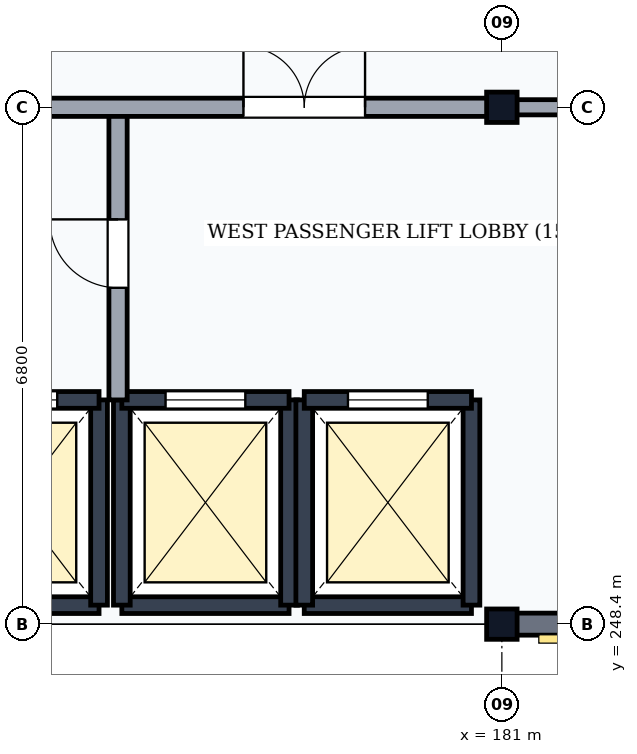
"""IFC4 building model, lengths in metres.
Left out: names, types, materials, properties, quantities, classifications, styles, units other than length and angle.
Written with IfcOpenShell. Run it as: python <this file> out.ifc"""

import sys

from ifc_helpers import new_model, si_unit, direction, frame, frame_2d, origin, origin_2d, place, context, subcontext, project, spatial, rectangle, i_section, extrude, element, fill, save


model = new_model("IFC4")
c1 = context("Model", 3, precision=1e-05, world=origin(), true_north=direction((0.0, 1.0)))
c2 = subcontext(c1, "Body", "Model", "MODEL_VIEW")
j1 = project(units=[si_unit("LENGTHUNIT", "METRE"), si_unit("PLANEANGLEUNIT", "RADIAN")], contexts=[c1])
p1 = place(None, origin())
s1 = spatial("IfcSite", under=j1, at=p1, CompositionType="ELEMENT")
p2 = place(p1, origin())
s2 = spatial("IfcBuilding", under=s1, at=p2, CompositionType="ELEMENT")
p3 = place(p2, frame((0.0, 0.0, 15.6)))
s3 = spatial("IfcBuildingStorey", under=s2, at=p3, CompositionType="ELEMENT", Elevation=15.6)
for number, where, z_axis, x_axis in (
    (1, (181.0, 248.4, 0.0), (0.0, 0.0, 1.0), (1.0, 0.0, 0.0)),
    (2, (181.0, 255.2, 0.0), (0.0, 0.0, 1.0), (1.0, 0.0, 0.0)),
):
    element("IfcColumn", number, at=place(p3, frame(where, z_axis=z_axis, x_axis=x_axis)), inside=s3, PredefinedType="COLUMN", context=c2, shape_type="SweptSolid", body=[
        extrude(i_section(OverallWidth=0.401, OverallDepth=0.399, WebThickness=0.025, FlangeThickness=0.04, FilletRadius=0.015, at=origin_2d()), origin(), (0.0, 0.0, 1.0), 4.8),
    ])
p4 = place(p3, frame((181.006, 248.4, 0.0), z_axis=(0.0, 0.0, 1.0), x_axis=(1.0, 0.0, 0.0)))
e3 = element("IfcWall", 3, at=p4, inside=s3, PredefinedType="SOLIDWALL", context=c2, shape_type="SweptSolid", body=[
    extrude(rectangle(XDim=7.988, YDim=0.29, at=frame_2d((3.994, 0.0))), origin(), (0.0, 0.0, 1.0), 4.168),
])
p5 = place(p4, frame((2.894, 0.0, 0.95)))
e4 = element("IfcOpeningElement", 4, at=p5, cuts=e3, PredefinedType="OPENING", context=c2, shape_type="SweptSolid", body=[
    extrude(rectangle(XDim=1.6, YDim=2.0, at=frame_2d((0.8, 1.0))), frame((0.0, 0.16, 0.0), z_axis=(0.0, -1.0, 0.0), x_axis=(1.0, 0.0, 0.0)), (0.0, 0.0, 1.0), 0.32),
])
p6 = place(p3, frame((173.5, 248.65, 0.0), z_axis=(0.0, 0.0, 1.0), x_axis=(1.0, 0.0, 0.0)))
e5 = element("IfcWall", 5, at=p6, inside=s3, PredefinedType="SHEAR", context=c2, shape_type="SweptSolid", body=[
    extrude(rectangle(XDim=2.2, YDim=0.22, at=frame_2d((1.1, 0.0))), origin(), (0.0, 0.0, 1.0), 4.48),
])
p7 = place(p3, frame((175.7, 248.65, 0.0), z_axis=(0.0, 0.0, 1.0), x_axis=(0.0, 1.0, 0.0)))
e6 = element("IfcWall", 6, at=p7, inside=s3, PredefinedType="SHEAR", context=c2, shape_type="SweptSolid", body=[
    extrude(rectangle(XDim=2.7, YDim=0.22, at=frame_2d((1.35, 0.0))), origin(), (0.0, 0.0, 1.0), 4.48),
])
p8 = place(p3, frame((173.5, 251.35, 0.0), z_axis=(0.0, 0.0, 1.0), x_axis=(1.0, 0.0, 0.0)))
e7 = element("IfcWall", 7, at=p8, inside=s3, PredefinedType="SHEAR", context=c2, shape_type="SweptSolid", body=[
    extrude(rectangle(XDim=2.2, YDim=0.22, at=frame_2d((1.1, 0.0))), origin(), (0.0, 0.0, 1.0), 4.48),
])
p9 = place(p8, frame((0.55, 0.0, 0.0)))
e8 = element("IfcOpeningElement", 8, at=p9, cuts=e7, PredefinedType="OPENING", context=c2, shape_type="SweptSolid", body=[
    extrude(rectangle(XDim=1.1, YDim=2.15, at=frame_2d((0.55, 1.075))), frame((0.0, 0.125, 0.0), z_axis=(0.0, -1.0, 0.0), x_axis=(1.0, 0.0, 0.0)), (0.0, 0.0, 1.0), 0.25),
])
p10 = place(p3, frame((176.0, 248.65, 0.0), z_axis=(0.0, 0.0, 1.0), x_axis=(1.0, 0.0, 0.0)))
e9 = element("IfcWall", 9, at=p10, inside=s3, PredefinedType="SHEAR", context=c2, shape_type="SweptSolid", body=[
    extrude(rectangle(XDim=2.2, YDim=0.22, at=frame_2d((1.1, 0.0))), origin(), (0.0, 0.0, 1.0), 4.48),
])
for number, where, z_axis, x_axis in (
    (10, (176.0, 248.65, 0.0), (0.0, 0.0, 1.0), (0.0, 1.0, 0.0)),
    (11, (178.2, 248.65, 0.0), (0.0, 0.0, 1.0), (0.0, 1.0, 0.0)),
):
    element("IfcWall", number, at=place(p3, frame(where, z_axis=z_axis, x_axis=x_axis)), inside=s3, PredefinedType="SHEAR", context=c2, shape_type="SweptSolid", body=[
        extrude(rectangle(XDim=2.7, YDim=0.22, at=frame_2d((1.35, 0.0))), origin(), (0.0, 0.0, 1.0), 4.48),
    ])
p11 = place(p3, frame((176.0, 251.35, 0.0), z_axis=(0.0, 0.0, 1.0), x_axis=(1.0, 0.0, 0.0)))
e12 = element("IfcWall", 12, at=p11, inside=s3, PredefinedType="SHEAR", context=c2, shape_type="SweptSolid", body=[
    extrude(rectangle(XDim=2.2, YDim=0.22, at=frame_2d((1.1, 0.0))), origin(), (0.0, 0.0, 1.0), 4.48),
])
p12 = place(p11, frame((0.575, 0.0, 0.0)))
e13 = element("IfcOpeningElement", 13, at=p12, cuts=e12, PredefinedType="OPENING", context=c2, shape_type="SweptSolid", body=[
    extrude(rectangle(XDim=1.05, YDim=2.15, at=frame_2d((0.525, 1.075))), frame((0.0, 0.125, 0.0), z_axis=(0.0, -1.0, 0.0), x_axis=(1.0, 0.0, 0.0)), (0.0, 0.0, 1.0), 0.25),
])
p13 = place(p3, frame((178.4, 248.65, 0.0), z_axis=(0.0, 0.0, 1.0), x_axis=(1.0, 0.0, 0.0)))
e14 = element("IfcWall", 14, at=p13, inside=s3, PredefinedType="SHEAR", context=c2, shape_type="SweptSolid", body=[
    extrude(rectangle(XDim=2.2, YDim=0.22, at=frame_2d((1.1, 0.0))), origin(), (0.0, 0.0, 1.0), 4.48),
])
for number, where, z_axis, x_axis in (
    (15, (178.4, 248.65, 0.0), (0.0, 0.0, 1.0), (0.0, 1.0, 0.0)),
    (16, (180.6, 248.65, 0.0), (0.0, 0.0, 1.0), (0.0, 1.0, 0.0)),
):
    element("IfcWall", number, at=place(p3, frame(where, z_axis=z_axis, x_axis=x_axis)), inside=s3, PredefinedType="SHEAR", context=c2, shape_type="SweptSolid", body=[
        extrude(rectangle(XDim=2.7, YDim=0.22, at=frame_2d((1.35, 0.0))), origin(), (0.0, 0.0, 1.0), 4.48),
    ])
p14 = place(p3, frame((178.4, 251.35, 0.0), z_axis=(0.0, 0.0, 1.0), x_axis=(1.0, 0.0, 0.0)))
e17 = element("IfcWall", 17, at=p14, inside=s3, PredefinedType="SHEAR", context=c2, shape_type="SweptSolid", body=[
    extrude(rectangle(XDim=2.2, YDim=0.22, at=frame_2d((1.1, 0.0))), origin(), (0.0, 0.0, 1.0), 4.48),
])
p15 = place(p14, frame((0.575, 0.0, 0.0)))
e18 = element("IfcOpeningElement", 18, at=p15, cuts=e17, PredefinedType="OPENING", context=c2, shape_type="SweptSolid", body=[
    extrude(rectangle(XDim=1.05, YDim=2.15, at=frame_2d((0.525, 1.075))), frame((0.0, 0.125, 0.0), z_axis=(0.0, -1.0, 0.0), x_axis=(1.0, 0.0, 0.0)), (0.0, 0.0, 1.0), 0.25),
])
p16 = place(p3, frame((175.95, 251.35, 0.0), z_axis=(0.0, 0.0, 1.0), x_axis=(0.0, 1.0, 0.0)))
e19 = element("IfcWall", 19, at=p16, inside=s3, PredefinedType="PARTITIONING", context=c2, shape_type="SweptSolid", body=[
    extrude(rectangle(XDim=3.85, YDim=0.24, at=frame_2d((1.925, 0.0))), origin(), (0.0, 0.0, 1.0), 4.48),
])
p17 = place(p16, frame((1.475, 0.0, 0.0)))
e20 = element("IfcOpeningElement", 20, at=p17, cuts=e19, PredefinedType="OPENING", context=c2, shape_type="SweptSolid", body=[
    extrude(rectangle(XDim=0.9, YDim=2.1, at=frame_2d((0.45, 1.05))), frame((0.0, 0.135, 0.0), z_axis=(0.0, -1.0, 0.0), x_axis=(1.0, 0.0, 0.0)), (0.0, 0.0, 1.0), 0.27),
])
p18 = place(p3, frame((173.0, 255.2, 0.0), z_axis=(0.0, 0.0, 1.0), x_axis=(1.0, 0.0, 0.0)))
e21 = element("IfcWall", 21, at=p18, inside=s3, PredefinedType="PARTITIONING", context=c2, shape_type="SweptSolid", body=[
    extrude(rectangle(XDim=8.0, YDim=0.24, at=frame_2d((4.0, 0.0))), origin(), (0.0, 0.0, 1.0), 3.928),
])
p19 = place(p18, frame((1.05, 0.0, 0.0)))
e22 = element("IfcOpeningElement", 22, at=p19, cuts=e21, PredefinedType="OPENING", context=c2, shape_type="SweptSolid", body=[
    extrude(rectangle(XDim=1.0, YDim=2.1, at=frame_2d((0.5, 1.05))), frame((0.0, 0.135, 0.0), z_axis=(0.0, -1.0, 0.0), x_axis=(1.0, 0.0, 0.0)), (0.0, 0.0, 1.0), 0.27),
])
p20 = place(p18, frame((4.6, 0.0, 0.0)))
e23 = element("IfcOpeningElement", 23, at=p20, cuts=e21, PredefinedType="OPENING", context=c2, shape_type="SweptSolid", body=[
    extrude(rectangle(XDim=1.6, YDim=2.25, at=frame_2d((0.8, 1.125))), frame((0.0, 0.135, 0.0), z_axis=(0.0, -1.0, 0.0), x_axis=(1.0, 0.0, 0.0)), (0.0, 0.0, 1.0), 0.27),
])
p21 = place(p3, frame((181.0, 255.2, 0.0), z_axis=(0.0, 0.0, 1.0), x_axis=(1.0, 0.0, 0.0)))
e24 = element("IfcWall", 24, at=p21, inside=s3, PredefinedType="PARTITIONING", context=c2, shape_type="SweptSolid", body=[
    extrude(rectangle(XDim=8.0, YDim=0.2, at=frame_2d((4.0, 0.0))), origin(), (0.0, 0.0, 1.0), 3.928),
])
p22 = place(p21, frame((0.85, 0.0, 0.0)))
e25 = element("IfcOpeningElement", 25, at=p22, cuts=e24, PredefinedType="OPENING", context=c2, shape_type="SweptSolid", body=[
    extrude(rectangle(XDim=0.9, YDim=2.1, at=frame_2d((0.45, 1.05))), frame((0.0, 0.115, 0.0), z_axis=(0.0, -1.0, 0.0), x_axis=(1.0, 0.0, 0.0)), (0.0, 0.0, 1.0), 0.23),
])
p23 = place(p21, frame((3.25, 0.0, 0.0)))
e26 = element("IfcOpeningElement", 26, at=p23, cuts=e24, PredefinedType="OPENING", context=c2, shape_type="SweptSolid", body=[
    extrude(rectangle(XDim=0.9, YDim=2.1, at=frame_2d((0.45, 1.05))), frame((0.0, 0.115, 0.0), z_axis=(0.0, -1.0, 0.0), x_axis=(1.0, 0.0, 0.0)), (0.0, 0.0, 1.0), 0.23),
])
p24 = place(p21, frame((5.075, 0.0, 0.0)))
e27 = element("IfcOpeningElement", 27, at=p24, cuts=e24, PredefinedType="OPENING", context=c2, shape_type="SweptSolid", body=[
    extrude(rectangle(XDim=0.95, YDim=2.1, at=frame_2d((0.475, 1.05))), frame((0.0, 0.115, 0.0), z_axis=(0.0, -1.0, 0.0), x_axis=(1.0, 0.0, 0.0)), (0.0, 0.0, 1.0), 0.23),
])
p25 = place(p21, frame((6.5, 0.0, 0.0)))
e28 = element("IfcOpeningElement", 28, at=p25, cuts=e24, PredefinedType="OPENING", context=c2, shape_type="SweptSolid", body=[
    extrude(rectangle(XDim=0.85, YDim=2.1, at=frame_2d((0.425, 1.05))), frame((0.0, 0.115, 0.0), z_axis=(0.0, -1.0, 0.0), x_axis=(1.0, 0.0, 0.0)), (0.0, 0.0, 1.0), 0.23),
])
p26 = place(p9, origin())
e29 = element("IfcDoor", 29, at=p26, inside=s3, OperationType="DOUBLE_DOOR_SLIDING", PredefinedType="USERDEFINED", context=c2, shape_type="SweptSolid", body=[
    extrude(rectangle(XDim=1.1, YDim=2.15, at=frame_2d((0.55, 1.075))), frame((0.0, 0.025, 0.0), z_axis=(0.0, -1.0, 0.0), x_axis=(1.0, 0.0, 0.0)), (0.0, 0.0, 1.0), 0.05),
])
fill(e8, e29)
p27 = place(p12, origin())
e30 = element("IfcDoor", 30, at=p27, inside=s3, OperationType="DOUBLE_DOOR_SLIDING", PredefinedType="USERDEFINED", context=c2, shape_type="SweptSolid", body=[
    extrude(rectangle(XDim=1.05, YDim=2.15, at=frame_2d((0.525, 1.075))), frame((0.0, 0.025, 0.0), z_axis=(0.0, -1.0, 0.0), x_axis=(1.0, 0.0, 0.0)), (0.0, 0.0, 1.0), 0.05),
])
fill(e13, e30)
p28 = place(p15, origin())
e31 = element("IfcDoor", 31, at=p28, inside=s3, OperationType="DOUBLE_DOOR_SLIDING", PredefinedType="USERDEFINED", context=c2, shape_type="SweptSolid", body=[
    extrude(rectangle(XDim=1.05, YDim=2.15, at=frame_2d((0.525, 1.075))), frame((0.0, 0.025, 0.0), z_axis=(0.0, -1.0, 0.0), x_axis=(1.0, 0.0, 0.0)), (0.0, 0.0, 1.0), 0.05),
])
fill(e18, e31)
p29 = place(p17, frame((0.9, 0.0, 0.0), z_axis=(0.0, 0.0, 1.0), x_axis=(-1.0, 0.0, 0.0)))
e32 = element("IfcDoor", 32, at=p29, inside=s3, OperationType="SINGLE_SWING_LEFT", PredefinedType="DOOR", context=c2, shape_type="SweptSolid", body=[
    extrude(rectangle(XDim=0.9, YDim=2.1, at=frame_2d((0.45, 1.05))), frame((0.0, 0.025, 0.0), z_axis=(0.0, -1.0, 0.0), x_axis=(1.0, 0.0, 0.0)), (0.0, 0.0, 1.0), 0.05),
])
fill(e20, e32)
p30 = place(p20, origin())
e33 = element("IfcDoor", 33, at=p30, inside=s3, OperationType="DOUBLE_DOOR_SINGLE_SWING", PredefinedType="DOOR", context=c2, shape_type="SweptSolid", body=[
    extrude(rectangle(XDim=1.6, YDim=2.25, at=frame_2d((0.8, 1.125))), frame((0.0, 0.025, 0.0), z_axis=(0.0, -1.0, 0.0), x_axis=(1.0, 0.0, 0.0)), (0.0, 0.0, 1.0), 0.05),
])
fill(e23, e33)
save(model, sys.argv[1])
